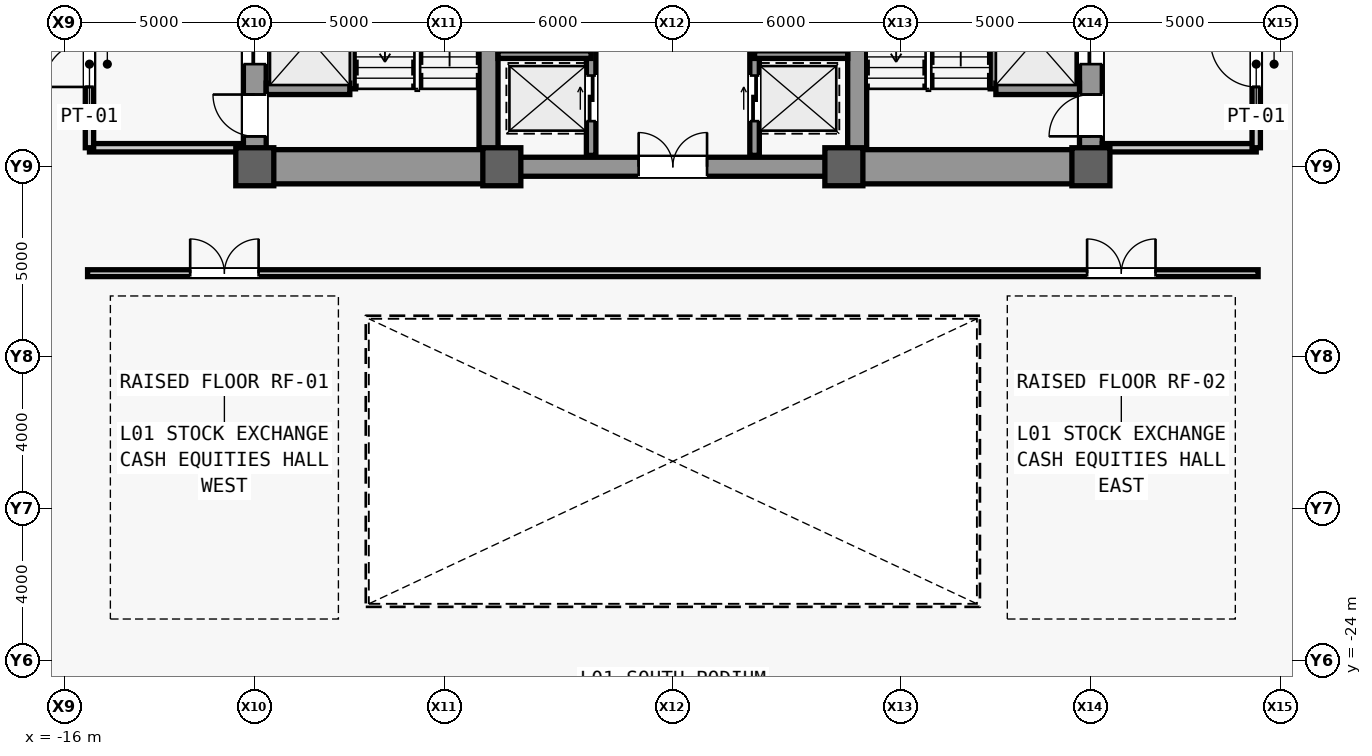
"""IFC4 building model, lengths in metres.
Left out: names, types, materials, properties, quantities, classifications, styles, units other than length and angle.
Written with IfcOpenShell. Run it as: python <this file> out.ifc"""

import sys

from ifc_helpers import new_model, si_unit, direction, frame, frame_2d, origin, origin_2d, place, context, subcontext, project, spatial, rectangle, extrude, source, transform, mapped, element, fill, save


model = new_model("IFC4")
c1 = context("Model", 3, precision=1e-05, world=origin(), true_north=direction((0.0, 1.0)))
c2 = subcontext(c1, "Body", "Model", "MODEL_VIEW")
j1 = project(units=[si_unit("LENGTHUNIT", "METRE"), si_unit("PLANEANGLEUNIT", "RADIAN")], contexts=[c1])
p1 = place(None, origin())
s1 = spatial("IfcSite", under=j1, at=p1, CompositionType="ELEMENT")
p2 = place(p1, origin())
s2 = spatial("IfcBuilding", under=s1, at=p2, CompositionType="ELEMENT")
p3 = place(p2, frame((0.0, 0.0, 6.6)))
s3 = spatial("IfcBuildingStorey", under=s2, at=p3, CompositionType="ELEMENT", Elevation=6.6)
m1 = source(origin(), c2, "Body", "SweptSolid", [
    extrude(rectangle(XDim=22.0, YDim=0.6, at=frame_2d((11.0, 0.0))), origin(), (0.0, 0.0, 1.0), 5.08),
])
p4 = place(p3, frame((-11.0, -11.0, 0.0), z_axis=(0.0, 0.0, 1.0), x_axis=(0.0, 1.0, 0.0)))
e1 = element("IfcWall", 1, at=p4, inside=s3, PredefinedType="SHEAR", context=c2, shape_type="MappedRepresentation", body=[
    mapped(m1, transform((0.0, 0.0, 0.0), scale=1.0)),
])
m2 = source(origin(), c2, "Body", "SweptSolid", [
    extrude(rectangle(XDim=1.1, YDim=2.2, at=frame_2d((0.55, 1.1))), frame((0.0, 0.31, 0.0), z_axis=(0.0, -1.0, 0.0), x_axis=(1.0, 0.0, 0.0)), (0.0, 0.0, 1.0), 0.62),
])
p5 = place(p4, frame((0.8, 0.0, 0.0)))
e2 = element("IfcOpeningElement", 2, at=p5, cuts=e1, PredefinedType="OPENING", context=c2, shape_type="MappedRepresentation", body=[
    mapped(m2, transform((0.0, 0.0, 0.0), scale=1.0)),
])
p6 = place(p4, frame((12.5, 0.0, 0.0)))
e3 = element("IfcOpeningElement", 3, at=p6, cuts=e1, PredefinedType="OPENING", context=c2, shape_type="MappedRepresentation", body=[
    mapped(m2, transform((0.0, 0.0, 0.0), scale=1.0)),
])
m3 = source(origin(), c2, "Body", "SweptSolid", [
    extrude(rectangle(XDim=0.9, YDim=2.15, at=frame_2d((0.45, 1.075))), frame((0.0, 0.31, 0.0), z_axis=(0.0, -1.0, 0.0), x_axis=(1.0, 0.0, 0.0)), (0.0, 0.0, 1.0), 0.62),
])
p7 = place(p4, frame((6.85, 0.0, 0.0)))
e4 = element("IfcOpeningElement", 4, at=p7, cuts=e1, PredefinedType="OPENING", context=c2, shape_type="MappedRepresentation", body=[
    mapped(m3, transform((0.0, 0.0, 0.0), scale=1.0)),
])
m4 = source(origin(), c2, "Body", "SweptSolid", [
    extrude(rectangle(XDim=1.3, YDim=2.3, at=frame_2d((0.65, 1.15))), frame((0.0, 0.31, 0.0), z_axis=(0.0, -1.0, 0.0), x_axis=(1.0, 0.0, 0.0)), (0.0, 0.0, 1.0), 0.62),
])
p8 = place(p4, frame((2.7, 0.0, 0.0)))
e5 = element("IfcOpeningElement", 5, at=p8, cuts=e1, PredefinedType="OPENING", context=c2, shape_type="MappedRepresentation", body=[
    mapped(m4, transform((0.0, 0.0, 0.0), scale=1.0)),
])
p9 = place(p3, frame((11.0, -11.0, 0.0), z_axis=(0.0, 0.0, 1.0), x_axis=(0.0, 1.0, 0.0)))
e6 = element("IfcWall", 6, at=p9, inside=s3, PredefinedType="SHEAR", context=c2, shape_type="MappedRepresentation", body=[
    mapped(m1, transform((0.0, 0.0, 0.0), scale=1.0)),
])
p10 = place(p9, frame((0.8, 0.0, 0.0)))
e7 = element("IfcOpeningElement", 7, at=p10, cuts=e6, PredefinedType="OPENING", context=c2, shape_type="MappedRepresentation", body=[
    mapped(m2, transform((0.0, 0.0, 0.0), scale=1.0)),
])
p11 = place(p9, frame((6.2, 0.0, 0.0)))
e8 = element("IfcOpeningElement", 8, at=p11, cuts=e6, PredefinedType="OPENING", context=c2, shape_type="MappedRepresentation", body=[
    mapped(m3, transform((0.0, 0.0, 0.0), scale=1.0)),
])
p12 = place(p9, frame((8.05, 0.0, 0.0)))
e9 = element("IfcOpeningElement", 9, at=p12, cuts=e6, PredefinedType="OPENING", context=c2, shape_type="MappedRepresentation", body=[
    mapped(m3, transform((0.0, 0.0, 0.0), scale=1.0)),
])
p13 = place(p9, frame((2.7, 0.0, 0.0)))
e10 = element("IfcOpeningElement", 10, at=p13, cuts=e6, PredefinedType="OPENING", context=c2, shape_type="MappedRepresentation", body=[
    mapped(m4, transform((0.0, 0.0, 0.0), scale=1.0)),
])
p14 = place(p9, frame((13.35, 0.0, 0.0)))
e11 = element("IfcOpeningElement", 11, at=p14, cuts=e6, PredefinedType="OPENING", context=c2, shape_type="MappedRepresentation", body=[
    mapped(m4, transform((0.0, 0.0, 0.0), scale=1.0)),
])
m5 = source(origin(), c2, "Body", "SweptSolid", [
    extrude(rectangle(XDim=21.4, YDim=0.5, at=frame_2d((10.7, 0.0))), origin(), (0.0, 0.0, 1.0), 5.08),
])
for number, where, z_axis, x_axis in (
    (12, (-4.85, -10.7, 0.0), (0.0, 0.0, 1.0), (0.0, 1.0, 0.0)),
    (13, (4.85, -10.7, 0.0), (0.0, 0.0, 1.0), (0.0, 1.0, 0.0)),
):
    element("IfcWall", number, at=place(p3, frame(where, z_axis=z_axis, x_axis=x_axis)), inside=s3, PredefinedType="SHEAR", context=c2, shape_type="MappedRepresentation", body=[
        mapped(m5, transform((0.0, 0.0, 0.0), scale=1.0)),
    ])
m6 = source(origin(), c2, "Body", "SweptSolid", [
    extrude(rectangle(XDim=5.85, YDim=0.9, at=frame_2d((2.925, 0.0))), origin(), (0.0, 0.0, 1.0), 5.08),
])
for number, where, z_axis, x_axis in (
    (14, (-10.7, -11.0, 0.0), (0.0, 0.0, 1.0), (1.0, 0.0, 0.0)),
    (15, (4.85, -11.0, 0.0), (0.0, 0.0, 1.0), (1.0, 0.0, 0.0)),
):
    element("IfcWall", number, at=place(p3, frame(where, z_axis=z_axis, x_axis=x_axis)), inside=s3, PredefinedType="SHEAR", context=c2, shape_type="MappedRepresentation", body=[
        mapped(m6, transform((0.0, 0.0, 0.0), scale=1.0)),
    ])
m7 = source(origin(), c2, "Body", "SweptSolid", [
    extrude(rectangle(XDim=9.2, YDim=0.5, at=frame_2d((4.6, 0.0))), origin(), (0.0, 0.0, 1.0), 5.08),
])
p15 = place(p3, frame((-4.6, -11.0, 0.0), z_axis=(0.0, 0.0, 1.0), x_axis=(1.0, 0.0, 0.0)))
e16 = element("IfcWall", 16, at=p15, inside=s3, PredefinedType="SHEAR", context=c2, shape_type="MappedRepresentation", body=[
    mapped(m7, transform((0.0, 0.0, 0.0), scale=1.0)),
])
m8 = source(origin(), c2, "Body", "SweptSolid", [
    extrude(rectangle(XDim=1.8, YDim=2.25, at=frame_2d((0.9, 1.125))), frame((0.0, 0.26, 0.0), z_axis=(0.0, -1.0, 0.0), x_axis=(1.0, 0.0, 0.0)), (0.0, 0.0, 1.0), 0.52),
])
p16 = place(p15, frame((3.7, 0.0, 0.0)))
e17 = element("IfcOpeningElement", 17, at=p16, cuts=e16, PredefinedType="OPENING", context=c2, shape_type="MappedRepresentation", body=[
    mapped(m8, transform((0.0, 0.0, 0.0), scale=1.0)),
])
m9 = source(origin(), c2, "Body", "SweptSolid", [
    extrude(rectangle(XDim=1.0, YDim=1.0, at=origin_2d()), origin(), (0.0, 0.0, 1.0), 5.4),
])
for number, where, z_axis, x_axis in (
    (18, (-11.0, -11.0, 0.0), (0.0, 0.0, 1.0), (1.0, 0.0, 0.0)),
    (19, (-4.5, -11.0, 0.0), (0.0, 0.0, 1.0), (1.0, 0.0, 0.0)),
    (20, (4.5, -11.0, 0.0), (0.0, 0.0, 1.0), (1.0, 0.0, 0.0)),
    (21, (11.0, -11.0, 0.0), (0.0, 0.0, 1.0), (1.0, 0.0, 0.0)),
):
    element("IfcColumn", number, at=place(p3, frame(where, z_axis=z_axis, x_axis=x_axis)), inside=s3, PredefinedType="COLUMN", context=c2, shape_type="MappedRepresentation", body=[
        mapped(m9, transform((0.0, 0.0, 0.0), scale=1.0)),
    ])
m10 = source(origin(), c2, "Body", "SweptSolid", [
    extrude(rectangle(XDim=7.8, YDim=0.3, at=frame_2d((3.9, 0.0))), origin(), (0.0, 0.0, 1.0), 5.08),
])
p17 = place(p3, frame((-8.5, -8.95, 0.0), z_axis=(0.0, 0.0, 1.0), x_axis=(0.0, 1.0, 0.0)))
e22 = element("IfcWall", 22, at=p17, inside=s3, PredefinedType="SHEAR", context=c2, shape_type="MappedRepresentation", body=[
    mapped(m10, transform((0.0, 0.0, 0.0), scale=1.0)),
])
m11 = source(origin(), c2, "Body", "SweptSolid", [
    extrude(rectangle(XDim=2.2, YDim=0.3, at=frame_2d((1.1, 0.0))), origin(), (0.0, 0.0, 1.0), 5.08),
])
p18 = place(p3, frame((-10.7, -8.95, 0.0), z_axis=(0.0, 0.0, 1.0), x_axis=(1.0, 0.0, 0.0)))
e23 = element("IfcWall", 23, at=p18, inside=s3, PredefinedType="SHEAR", context=c2, shape_type="MappedRepresentation", body=[
    mapped(m11, transform((0.0, 0.0, 0.0), scale=1.0)),
])
p19 = place(p3, frame((8.5, -8.95, 0.0), z_axis=(0.0, 0.0, 1.0), x_axis=(0.0, 1.0, 0.0)))
e24 = element("IfcWall", 24, at=p19, inside=s3, PredefinedType="SHEAR", context=c2, shape_type="MappedRepresentation", body=[
    mapped(m10, transform((0.0, 0.0, 0.0), scale=1.0)),
])
p20 = place(p3, frame((8.5, -8.95, 0.0), z_axis=(0.0, 0.0, 1.0), x_axis=(1.0, 0.0, 0.0)))
e25 = element("IfcWall", 25, at=p20, inside=s3, PredefinedType="SHEAR", context=c2, shape_type="MappedRepresentation", body=[
    mapped(m11, transform((0.0, 0.0, 0.0), scale=1.0)),
])
m12 = source(origin(), c2, "Body", "SweptSolid", [
    extrude(rectangle(XDim=4.05, YDim=0.22, at=frame_2d((2.025, 0.0))), origin(), (0.0, 0.0, 1.0), 5.08),
])
p21 = place(p3, frame((-15.35, -10.5, 0.0), z_axis=(0.0, 0.0, 1.0), x_axis=(1.0, 0.0, 0.0)))
e26 = element("IfcWall", 26, at=p21, inside=s3, PredefinedType="PARTITIONING", context=c2, shape_type="MappedRepresentation", body=[
    mapped(m12, transform((0.0, 0.0, 0.0), scale=1.0)),
])
m13 = source(origin(), c2, "Body", "SweptSolid", [
    extrude(rectangle(XDim=4.4, YDim=0.22, at=frame_2d((2.2, 0.0))), origin(), (0.0, 0.0, 1.0), 5.08),
])
p22 = place(p3, frame((-15.35, -10.5, 0.0), z_axis=(0.0, 0.0, 1.0), x_axis=(0.0, 1.0, 0.0)))
e27 = element("IfcWall", 27, at=p22, inside=s3, PredefinedType="PARTITIONING", context=c2, shape_type="MappedRepresentation", body=[
    mapped(m13, transform((0.0, 0.0, 0.0), scale=1.0)),
])
m14 = source(origin(), c2, "Body", "SweptSolid", [
    extrude(rectangle(XDim=1.2, YDim=2.2, at=frame_2d((0.6, 1.1))), frame((0.0, 0.12, 0.0), z_axis=(0.0, -1.0, 0.0), x_axis=(1.0, 0.0, 0.0)), (0.0, 0.0, 1.0), 0.24),
])
p23 = place(p22, frame((1.6, 0.0, 0.0)))
e28 = element("IfcOpeningElement", 28, at=p23, cuts=e27, PredefinedType="OPENING", context=c2, shape_type="MappedRepresentation", body=[
    mapped(m14, transform((0.0, 0.0, 0.0), scale=1.0)),
])
p24 = place(p3, frame((11.3, -10.5, 0.0), z_axis=(0.0, 0.0, 1.0), x_axis=(1.0, 0.0, 0.0)))
e29 = element("IfcWall", 29, at=p24, inside=s3, PredefinedType="PARTITIONING", context=c2, shape_type="MappedRepresentation", body=[
    mapped(m12, transform((0.0, 0.0, 0.0), scale=1.0)),
])
p25 = place(p3, frame((15.35, -10.5, 0.0), z_axis=(0.0, 0.0, 1.0), x_axis=(0.0, 1.0, 0.0)))
e30 = element("IfcWall", 30, at=p25, inside=s3, PredefinedType="PARTITIONING", context=c2, shape_type="MappedRepresentation", body=[
    mapped(m13, transform((0.0, 0.0, 0.0), scale=1.0)),
])
p26 = place(p25, frame((1.6, 0.0, 0.0)))
e31 = element("IfcOpeningElement", 31, at=p26, cuts=e30, PredefinedType="OPENING", context=c2, shape_type="MappedRepresentation", body=[
    mapped(m14, transform((0.0, 0.0, 0.0), scale=1.0)),
])
m15 = source(origin(), c2, "Body", "SweptSolid", [
    extrude(rectangle(XDim=5.4, YDim=0.25, at=frame_2d((2.7, 0.0))), origin(), (0.0, 0.0, 1.0), 5.08),
])
p27 = place(p3, frame((-2.15, -10.7, 0.0), z_axis=(0.0, 0.0, 1.0), x_axis=(0.0, 1.0, 0.0)))
e32 = element("IfcWall", 32, at=p27, inside=s3, PredefinedType="SHEAR", context=c2, shape_type="MappedRepresentation", body=[
    mapped(m15, transform((0.0, 0.0, 0.0), scale=1.0)),
])
m16 = source(origin(), c2, "Body", "SweptSolid", [
    extrude(rectangle(XDim=1.2, YDim=2.3, at=frame_2d((0.6, 1.15))), frame((0.0, 0.135, 0.0), z_axis=(0.0, -1.0, 0.0), x_axis=(1.0, 0.0, 0.0)), (0.0, 0.0, 1.0), 0.27),
])
p28 = place(p27, frame((0.9, 0.0, 0.0)))
e33 = element("IfcOpeningElement", 33, at=p28, cuts=e32, PredefinedType="OPENING", context=c2, shape_type="MappedRepresentation", body=[
    mapped(m16, transform((0.0, 0.0, 0.0), scale=1.0)),
])
p29 = place(p27, frame((3.2, 0.0, 0.0)))
e34 = element("IfcOpeningElement", 34, at=p29, cuts=e32, PredefinedType="OPENING", context=c2, shape_type="MappedRepresentation", body=[
    mapped(m16, transform((0.0, 0.0, 0.0), scale=1.0)),
])
p30 = place(p3, frame((2.15, -10.7, 0.0), z_axis=(0.0, 0.0, 1.0), x_axis=(0.0, 1.0, 0.0)))
e35 = element("IfcWall", 35, at=p30, inside=s3, PredefinedType="SHEAR", context=c2, shape_type="MappedRepresentation", body=[
    mapped(m15, transform((0.0, 0.0, 0.0), scale=1.0)),
])
p31 = place(p30, frame((0.9, 0.0, 0.0)))
e36 = element("IfcOpeningElement", 36, at=p31, cuts=e35, PredefinedType="OPENING", context=c2, shape_type="MappedRepresentation", body=[
    mapped(m16, transform((0.0, 0.0, 0.0), scale=1.0)),
])
p32 = place(p30, frame((3.2, 0.0, 0.0)))
e37 = element("IfcOpeningElement", 37, at=p32, cuts=e35, PredefinedType="OPENING", context=c2, shape_type="MappedRepresentation", body=[
    mapped(m16, transform((0.0, 0.0, 0.0), scale=1.0)),
])
m17 = source(origin(), c2, "Body", "SweptSolid", [
    extrude(rectangle(XDim=2.45, YDim=0.2, at=frame_2d((1.225, 0.0))), origin(), (0.0, 0.0, 1.0), 5.08),
])
for number, where, z_axis, x_axis in (
    (38, (-4.6, -8.05, 0.0), (0.0, 0.0, 1.0), (1.0, 0.0, 0.0)),
    (39, (2.15, -8.05, 0.0), (0.0, 0.0, 1.0), (1.0, 0.0, 0.0)),
):
    element("IfcWall", number, at=place(p3, frame(where, z_axis=z_axis, x_axis=x_axis)), inside=s3, PredefinedType="SHEAR", context=c2, shape_type="MappedRepresentation", body=[
        mapped(m17, transform((0.0, 0.0, 0.0), scale=1.0)),
    ])
m18 = source(origin(), c2, "Body", "SweptSolid", [
    extrude(rectangle(XDim=30.8, YDim=0.18, at=frame_2d((15.4, 0.0))), origin(), (0.0, 0.0, 1.0), 5.08),
])
p33 = place(p3, frame((-15.4, -13.8, 0.0), z_axis=(0.0, 0.0, 1.0), x_axis=(1.0, 0.0, 0.0)))
e40 = element("IfcWall", 40, at=p33, inside=s3, PredefinedType="PARTITIONING", context=c2, shape_type="MappedRepresentation", body=[
    mapped(m18, transform((0.0, 0.0, 0.0), scale=1.0)),
])
m19 = source(origin(), c2, "Body", "SweptSolid", [
    extrude(rectangle(XDim=1.8, YDim=2.25, at=frame_2d((0.9, 1.125))), frame((0.0, 0.1, 0.0), z_axis=(0.0, -1.0, 0.0), x_axis=(1.0, 0.0, 0.0)), (0.0, 0.0, 1.0), 0.2),
])
p34 = place(p33, frame((2.7, 0.0, 0.0)))
e41 = element("IfcOpeningElement", 41, at=p34, cuts=e40, PredefinedType="OPENING", context=c2, shape_type="MappedRepresentation", body=[
    mapped(m19, transform((0.0, 0.0, 0.0), scale=1.0)),
])
p35 = place(p33, frame((26.3, 0.0, 0.0)))
e42 = element("IfcOpeningElement", 42, at=p35, cuts=e40, PredefinedType="OPENING", context=c2, shape_type="MappedRepresentation", body=[
    mapped(m19, transform((0.0, 0.0, 0.0), scale=1.0)),
])
m20 = source(origin(), c2, "Body", "SweptSolid", [
    extrude(rectangle(XDim=1.1, YDim=2.2, at=frame_2d((0.55, 1.1))), frame((0.0, 0.025, 0.0), z_axis=(0.0, -1.0, 0.0), x_axis=(1.0, 0.0, 0.0)), (0.0, 0.0, 1.0), 0.05),
])
p36 = place(p5, origin())
e43 = element("IfcDoor", 43, at=p36, inside=s3, OperationType="SINGLE_SWING_RIGHT", PredefinedType="DOOR", context=c2, shape_type="MappedRepresentation", body=[
    mapped(m20, transform((0.0, 0.0, 0.0), scale=1.0)),
])
fill(e2, e43)
p37 = place(p10, origin())
e44 = element("IfcDoor", 44, at=p37, inside=s3, OperationType="SINGLE_SWING_LEFT", PredefinedType="DOOR", context=c2, shape_type="MappedRepresentation", body=[
    mapped(m20, transform((0.0, 0.0, 0.0), scale=1.0)),
])
fill(e7, e44)
m21 = source(origin(), c2, "Body", "SweptSolid", [
    extrude(rectangle(XDim=1.2, YDim=2.2, at=frame_2d((0.6, 1.1))), frame((0.0, 0.025, 0.0), z_axis=(0.0, -1.0, 0.0), x_axis=(1.0, 0.0, 0.0)), (0.0, 0.0, 1.0), 0.05),
])
p38 = place(p23, origin())
e45 = element("IfcDoor", 45, at=p38, inside=s3, OperationType="SINGLE_SWING_LEFT", PredefinedType="DOOR", context=c2, shape_type="MappedRepresentation", body=[
    mapped(m21, transform((0.0, 0.0, 0.0), scale=1.0)),
])
fill(e28, e45)
p39 = place(p26, origin())
e46 = element("IfcDoor", 46, at=p39, inside=s3, OperationType="SINGLE_SWING_RIGHT", PredefinedType="DOOR", context=c2, shape_type="MappedRepresentation", body=[
    mapped(m21, transform((0.0, 0.0, 0.0), scale=1.0)),
])
fill(e31, e46)
m22 = source(origin(), c2, "Body", "SweptSolid", [
    extrude(rectangle(XDim=1.8, YDim=2.25, at=frame_2d((0.9, 1.125))), frame((0.0, 0.025, 0.0), z_axis=(0.0, -1.0, 0.0), x_axis=(1.0, 0.0, 0.0)), (0.0, 0.0, 1.0), 0.05),
])
p40 = place(p16, origin())
e47 = element("IfcDoor", 47, at=p40, inside=s3, OperationType="SINGLE_SWING_LEFT", PredefinedType="DOOR", context=c2, shape_type="MappedRepresentation", body=[
    mapped(m22, transform((0.0, 0.0, 0.0), scale=1.0)),
])
fill(e17, e47)
p41 = place(p34, origin())
e48 = element("IfcDoor", 48, at=p41, inside=s3, OperationType="SINGLE_SWING_LEFT", PredefinedType="DOOR", context=c2, shape_type="MappedRepresentation", body=[
    mapped(m22, transform((0.0, 0.0, 0.0), scale=1.0)),
])
fill(e41, e48)
p42 = place(p35, origin())
e49 = element("IfcDoor", 49, at=p42, inside=s3, OperationType="SINGLE_SWING_RIGHT", PredefinedType="DOOR", context=c2, shape_type="MappedRepresentation", body=[
    mapped(m22, transform((0.0, 0.0, 0.0), scale=1.0)),
])
fill(e42, e49)
m23 = source(origin(), c2, "Body", "SweptSolid", [
    extrude(rectangle(XDim=1.2, YDim=2.3, at=frame_2d((0.6, 1.15))), frame((0.0, 0.025, 0.0), z_axis=(0.0, -1.0, 0.0), x_axis=(1.0, 0.0, 0.0)), (0.0, 0.0, 1.0), 0.05),
])
p43 = place(p28, origin())
e50 = element("IfcDoor", 50, at=p43, inside=s3, OperationType="SLIDING_TO_LEFT", PredefinedType="DOOR", context=c2, shape_type="MappedRepresentation", body=[
    mapped(m23, transform((0.0, 0.0, 0.0), scale=1.0)),
])
fill(e33, e50)
p44 = place(p31, origin())
e51 = element("IfcDoor", 51, at=p44, inside=s3, OperationType="SLIDING_TO_LEFT", PredefinedType="DOOR", context=c2, shape_type="MappedRepresentation", body=[
    mapped(m23, transform((0.0, 0.0, 0.0), scale=1.0)),
])
fill(e36, e51)
m24 = source(origin(), c2, "Body", "SweptSolid", [
    extrude(rectangle(XDim=1.3, YDim=2.3, at=frame_2d((0.65, 1.15))), frame((0.0, 0.025, 0.0), z_axis=(0.0, -1.0, 0.0), x_axis=(1.0, 0.0, 0.0)), (0.0, 0.0, 1.0), 0.05),
])
p45 = place(p8, origin())
e52 = element("IfcDoor", 52, at=p45, inside=s3, OperationType="SLIDING_TO_LEFT", PredefinedType="DOOR", context=c2, shape_type="MappedRepresentation", body=[
    mapped(m24, transform((0.0, 0.0, 0.0), scale=1.0)),
])
fill(e5, e52)
p46 = place(p13, origin())
e53 = element("IfcDoor", 53, at=p46, inside=s3, OperationType="SLIDING_TO_LEFT", PredefinedType="DOOR", context=c2, shape_type="MappedRepresentation", body=[
    mapped(m24, transform((0.0, 0.0, 0.0), scale=1.0)),
])
fill(e10, e53)
save(model, sys.argv[1])
